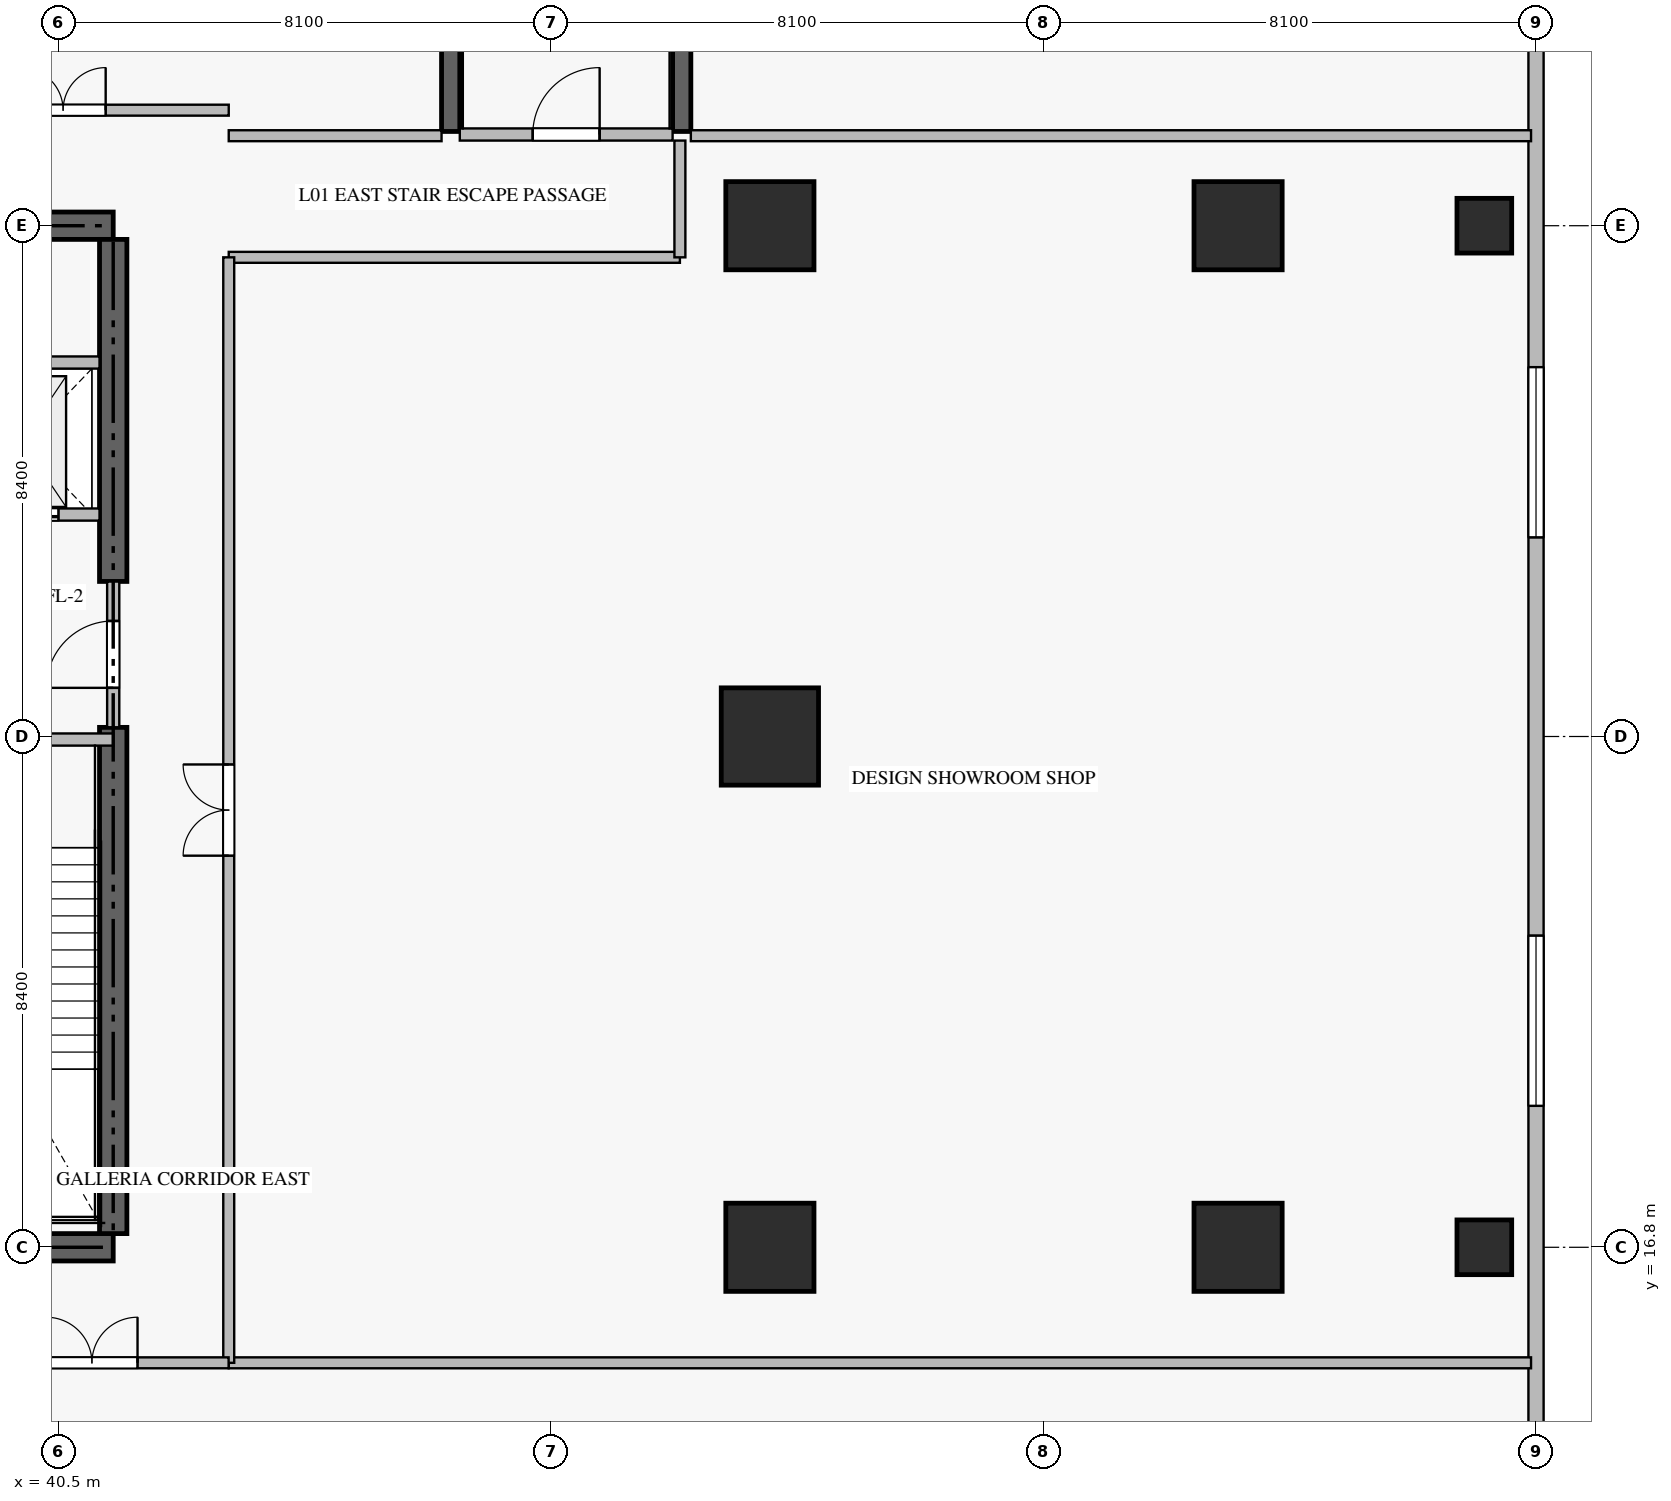
"""IFC4 building model, lengths in metres.
Left out: names, types, materials, properties, quantities, classifications, styles, units other than length and angle.
Written with IfcOpenShell. Run it as: python <this file> out.ifc"""

import sys

from ifc_helpers import new_model, si_unit, direction, frame, frame_2d, origin, origin_2d, place, context, subcontext, project, spatial, rectangle, extrude, source, transform, mapped, element, fill, save


model = new_model("IFC4")
c1 = context("Model", 3, precision=1e-05, world=origin(), true_north=direction((0.0, 1.0)))
c2 = subcontext(c1, "Body", "Model", "MODEL_VIEW")
j1 = project(units=[si_unit("LENGTHUNIT", "METRE"), si_unit("PLANEANGLEUNIT", "RADIAN")], contexts=[c1])
p1 = place(None, origin())
s1 = spatial("IfcSite", under=j1, at=p1, CompositionType="ELEMENT")
p2 = place(p1, origin())
s2 = spatial("IfcBuilding", under=s1, at=p2, CompositionType="ELEMENT")
p3 = place(p2, frame((0.0, 0.0, 5.5)))
s3 = spatial("IfcBuildingStorey", under=s2, at=p3, CompositionType="ELEMENT", Elevation=5.5)
for number, where, z_axis, x_axis in (
    (1, (23.4, 16.8, -0.38), (0.0, 0.0, 1.0), (1.0, 0.0, 0.0)),
    (2, (41.4, 33.6, -0.38), (0.0, 0.0, 1.0), (-1.0, 0.0, 0.0)),
):
    element("IfcWall", number, at=place(p3, frame(where, z_axis=z_axis, x_axis=x_axis)), inside=s3, PredefinedType="SHEAR", context=c2, shape_type="SweptSolid", body=[
        extrude(rectangle(XDim=18.0, YDim=0.45, at=frame_2d((9.0, 0.0))), origin(), (0.0, 0.0, 1.0), 4.998),
    ])
p4 = place(p3, frame((41.4, 17.025, -0.38), z_axis=(0.0, 0.0, 1.0), x_axis=(0.0, 1.0, 0.0)))
e3 = element("IfcWall", 3, at=p4, inside=s3, PredefinedType="SHEAR", context=c2, shape_type="SweptSolid", body=[
    extrude(rectangle(XDim=8.325, YDim=0.45, at=frame_2d((4.163, 0.0))), origin(), (0.0, 0.0, 1.0), 4.998),
])
p5 = place(p3, frame((41.4, 27.75, -0.38), z_axis=(0.0, 0.0, 1.0), x_axis=(0.0, 1.0, 0.0)))
e4 = element("IfcWall", 4, at=p5, inside=s3, PredefinedType="SHEAR", context=c2, shape_type="SweptSolid", body=[
    extrude(rectangle(XDim=5.625, YDim=0.45, at=frame_2d((2.812, 0.0))), origin(), (0.0, 0.0, 1.0), 4.998),
])
m1 = source(origin(), c2, "Body", "SweptSolid", [
    extrude(rectangle(XDim=0.9, YDim=0.9, at=origin_2d()), origin(), (0.0, 0.0, 1.0), 5.0),
])
for number, where, z_axis, x_axis in (
    (5, (63.95, 16.8, -0.38), (0.0, 0.0, 1.0), (1.0, 0.0, 0.0)),
    (6, (63.95, 33.6, -0.38), (0.0, 0.0, 1.0), (1.0, 0.0, 0.0)),
):
    element("IfcColumn", number, at=place(p3, frame(where, z_axis=z_axis, x_axis=x_axis)), inside=s3, PredefinedType="COLUMN", context=c2, shape_type="MappedRepresentation", body=[
        mapped(m1, transform((0.0, 0.0, 0.0), scale=1.0)),
    ])
m2 = source(origin(), c2, "Body", "SweptSolid", [
    extrude(rectangle(XDim=1.45, YDim=1.45, at=origin_2d()), origin(), (0.0, 0.0, 1.0), 5.0),
])
p6 = place(p3, frame((52.2, 16.8, -0.38), z_axis=(0.0, 0.0, 1.0), x_axis=(1.0, 0.0, 0.0)))
e7 = element("IfcColumn", 7, at=p6, inside=s3, PredefinedType="COLUMN", context=c2, shape_type="MappedRepresentation", body=[
    mapped(m2, transform((0.0, 0.0, 0.0), scale=1.0)),
])
m3 = source(origin(), c2, "Body", "SweptSolid", [
    extrude(rectangle(XDim=1.6, YDim=1.6, at=origin_2d()), origin(), (0.0, 0.0, 1.0), 5.0),
])
p7 = place(p3, frame((52.2, 25.2, -0.38), z_axis=(0.0, 0.0, 1.0), x_axis=(1.0, 0.0, 0.0)))
e8 = element("IfcColumn", 8, at=p7, inside=s3, PredefinedType="COLUMN", context=c2, shape_type="MappedRepresentation", body=[
    mapped(m3, transform((0.0, 0.0, 0.0), scale=1.0)),
])
for number, where, z_axis, x_axis in (
    (9, (52.2, 33.6, -0.38), (0.0, 0.0, 1.0), (1.0, 0.0, 0.0)),
    (10, (59.9, 16.8, -0.38), (0.0, 0.0, 1.0), (1.0, 0.0, 0.0)),
    (11, (59.9, 33.6, -0.38), (0.0, 0.0, 1.0), (1.0, 0.0, 0.0)),
):
    element("IfcColumn", number, at=place(p3, frame(where, z_axis=z_axis, x_axis=x_axis)), inside=s3, PredefinedType="COLUMN", context=c2, shape_type="MappedRepresentation", body=[
        mapped(m2, transform((0.0, 0.0, 0.0), scale=1.0)),
    ])
p8 = place(p3, frame((64.8, 4.325, 0.0), z_axis=(0.0, 0.0, 1.0), x_axis=(0.0, 1.0, 0.0)))
e12 = element("IfcWall", 12, at=p8, inside=s3, PredefinedType="ELEMENTEDWALL", context=c2, shape_type="SweptSolid", body=[
    extrude(rectangle(XDim=41.75, YDim=0.25, at=frame_2d((20.875, 0.0))), origin(), (0.0, 0.0, 1.0), 4.605),
])
p9 = place(p8, frame((14.801, 0.0, 0.6)))
e13 = element("IfcOpeningElement", 13, at=p9, cuts=e12, PredefinedType="OPENING", context=c2, shape_type="SweptSolid", body=[
    extrude(rectangle(XDim=2.8, YDim=3.0, at=frame_2d((1.4, 1.5))), frame((0.0, 0.135, 0.0), z_axis=(0.0, -1.0, 0.0), x_axis=(1.0, 0.0, 0.0)), (0.0, 0.0, 1.0), 0.27),
])
p10 = place(p8, frame((24.149, 0.0, 0.6)))
e14 = element("IfcOpeningElement", 14, at=p10, cuts=e12, PredefinedType="OPENING", context=c2, shape_type="SweptSolid", body=[
    extrude(rectangle(XDim=2.8, YDim=3.0, at=frame_2d((1.4, 1.5))), frame((0.0, 0.135, 0.0), z_axis=(0.0, -1.0, 0.0), x_axis=(1.0, 0.0, 0.0)), (0.0, 0.0, 1.0), 0.27),
])
p11 = place(p3, frame((36.95, 25.15, 0.0), z_axis=(0.0, 0.0, 1.0), x_axis=(1.0, 0.0, 0.0)))
e15 = element("IfcWall", 15, at=p11, inside=s3, PredefinedType="STANDARD", context=c2, shape_type="SweptSolid", body=[
    extrude(rectangle(XDim=4.45, YDim=0.2, at=frame_2d((2.225, 0.0))), origin(), (0.0, 0.0, 1.0), 4.62),
])
p12 = place(p11, frame((1.65, 0.0, 0.0)))
e16 = element("IfcOpeningElement", 16, at=p12, cuts=e15, PredefinedType="OPENING", context=c2, shape_type="SweptSolid", body=[
    extrude(rectangle(XDim=1.1, YDim=2.15, at=frame_2d((0.55, 1.075))), frame((0.0, 0.11, 0.0), z_axis=(0.0, -1.0, 0.0), x_axis=(1.0, 0.0, 0.0)), (0.0, 0.0, 1.0), 0.22),
])
for number, where, z_axis, x_axis in (
    (17, (46.95, 35.15, -0.38), (0.0, 0.0, 1.0), (0.0, 1.0, 0.0)),
    (18, (50.75, 35.15, -0.38), (0.0, 0.0, 1.0), (0.0, 1.0, 0.0)),
):
    element("IfcWall", number, at=place(p3, frame(where, z_axis=z_axis, x_axis=x_axis)), inside=s3, PredefinedType="SHEAR", context=c2, shape_type="SweptSolid", body=[
        extrude(rectangle(XDim=7.9, YDim=0.3, at=frame_2d((3.95, 0.0))), origin(), (0.0, 0.0, 1.0), 4.998),
    ])
p13 = place(p3, frame((47.1, 35.1, 0.0), z_axis=(0.0, 0.0, 1.0), x_axis=(1.0, 0.0, 0.0)))
e19 = element("IfcWall", 19, at=p13, inside=s3, PredefinedType="STANDARD", context=c2, shape_type="SweptSolid", body=[
    extrude(rectangle(XDim=3.5, YDim=0.2, at=frame_2d((1.75, 0.0))), origin(), (0.0, 0.0, 1.0), 4.62),
])
p14 = place(p13, frame((1.2, 0.0, 0.0)))
e20 = element("IfcOpeningElement", 20, at=p14, cuts=e19, PredefinedType="OPENING", context=c2, shape_type="SweptSolid", body=[
    extrude(rectangle(XDim=1.1, YDim=2.15, at=frame_2d((0.55, 1.075))), frame((0.0, 0.11, 0.0), z_axis=(0.0, -1.0, 0.0), x_axis=(1.0, 0.0, 0.0)), (0.0, 0.0, 1.0), 0.22),
])
p15 = place(p3, frame((38.75, 28.85, 0.0), z_axis=(0.0, 0.0, 1.0), x_axis=(1.0, 0.0, 0.0)))
e21 = element("IfcWall", 21, at=p15, inside=s3, PredefinedType="STANDARD", context=c2, shape_type="SweptSolid", body=[
    extrude(rectangle(XDim=2.425, YDim=0.2, at=frame_2d((1.212, 0.0))), origin(), (0.0, 0.0, 1.0), 4.62),
])
p16 = place(p15, frame((0.55, 0.0, 0.0)))
e22 = element("IfcOpeningElement", 22, at=p16, cuts=e21, PredefinedType="OPENING", context=c2, shape_type="SweptSolid", body=[
    extrude(rectangle(XDim=1.2, YDim=2.2, at=frame_2d((0.6, 1.1))), frame((0.0, 0.11, 0.0), z_axis=(0.0, -1.0, 0.0), x_axis=(1.0, 0.0, 0.0)), (0.0, 0.0, 1.0), 0.22),
])
p17 = place(p3, frame((38.75, 31.35, 0.0), z_axis=(0.0, 0.0, 1.0), x_axis=(1.0, 0.0, 0.0)))
e23 = element("IfcWall", 23, at=p17, inside=s3, PredefinedType="STANDARD", context=c2, shape_type="SweptSolid", body=[
    extrude(rectangle(XDim=2.425, YDim=0.2, at=frame_2d((1.212, 0.0))), origin(), (0.0, 0.0, 1.0), 4.62),
])
p18 = place(p3, frame((41.4, 25.352, 0.0), z_axis=(0.0, 0.0, 1.0), x_axis=(0.0, 1.0, 0.0)))
e24 = element("IfcWall", 24, at=p18, inside=s3, PredefinedType="STANDARD", context=c2, shape_type="SweptSolid", body=[
    extrude(rectangle(XDim=2.396, YDim=0.2, at=frame_2d((1.198, 0.0))), origin(), (0.0, 0.0, 1.0), 4.62),
])
p19 = place(p18, frame((0.648, 0.0, 0.0)))
e25 = element("IfcOpeningElement", 25, at=p19, cuts=e24, PredefinedType="OPENING", context=c2, shape_type="SweptSolid", body=[
    extrude(rectangle(XDim=1.1, YDim=2.15, at=frame_2d((0.55, 1.075))), frame((0.0, 0.11, 0.0), z_axis=(0.0, -1.0, 0.0), x_axis=(1.0, 0.0, 0.0)), (0.0, 0.0, 1.0), 0.22),
])
p20 = place(p3, frame((43.3, 14.9, 0.0), z_axis=(0.0, 0.0, 1.0), x_axis=(1.0, 0.0, 0.0)))
e26 = element("IfcWall", 26, at=p20, inside=s3, PredefinedType="PARTITIONING", context=c2, shape_type="SweptSolid", body=[
    extrude(rectangle(XDim=21.418, YDim=0.18, at=frame_2d((10.709, 0.0))), origin(), (0.0, 0.0, 1.0), 4.62),
])
p21 = place(p3, frame((43.3, 35.08, 0.0), z_axis=(0.0, 0.0, 1.0), x_axis=(1.0, 0.0, 0.0)))
e27 = element("IfcWall", 27, at=p21, inside=s3, PredefinedType="PARTITIONING", context=c2, shape_type="SweptSolid", body=[
    extrude(rectangle(XDim=3.5, YDim=0.18, at=frame_2d((1.75, 0.0))), origin(), (0.0, 0.0, 1.0), 4.62),
])
p22 = place(p3, frame((43.3, 33.08, 0.0), z_axis=(0.0, 0.0, 1.0), x_axis=(1.0, 0.0, 0.0)))
e28 = element("IfcWall", 28, at=p22, inside=s3, PredefinedType="PARTITIONING", context=c2, shape_type="SweptSolid", body=[
    extrude(rectangle(XDim=7.42, YDim=0.18, at=frame_2d((3.71, 0.0))), origin(), (0.0, 0.0, 1.0), 4.62),
])
p23 = place(p3, frame((50.9, 35.08, 0.0), z_axis=(0.0, 0.0, 1.0), x_axis=(1.0, 0.0, 0.0)))
e29 = element("IfcWall", 29, at=p23, inside=s3, PredefinedType="PARTITIONING", context=c2, shape_type="SweptSolid", body=[
    extrude(rectangle(XDim=13.818, YDim=0.18, at=frame_2d((6.909, 0.0))), origin(), (0.0, 0.0, 1.0), 4.62),
])
p24 = place(p3, frame((50.72, 33.08, 0.0), z_axis=(0.0, 0.0, 1.0), x_axis=(0.0, 1.0, 0.0)))
e30 = element("IfcWall", 30, at=p24, inside=s3, PredefinedType="PARTITIONING", context=c2, shape_type="SweptSolid", body=[
    extrude(rectangle(XDim=1.92, YDim=0.18, at=frame_2d((0.96, 0.0))), origin(), (0.0, 0.0, 1.0), 4.62),
])
p25 = place(p3, frame((43.3, 14.9, 0.0), z_axis=(0.0, 0.0, 1.0), x_axis=(0.0, 1.0, 0.0)))
e31 = element("IfcWall", 31, at=p25, inside=s3, PredefinedType="PARTITIONING", context=c2, shape_type="SweptSolid", body=[
    extrude(rectangle(XDim=18.18, YDim=0.18, at=frame_2d((9.09, 0.0))), origin(), (0.0, 0.0, 1.0), 4.62),
])
p26 = place(p25, frame((8.34, 0.0, 0.0)))
e32 = element("IfcOpeningElement", 32, at=p26, cuts=e31, PredefinedType="OPENING", context=c2, shape_type="SweptSolid", body=[
    extrude(rectangle(XDim=1.5, YDim=2.25, at=frame_2d((0.75, 1.125))), frame((0.0, 0.1, 0.0), z_axis=(0.0, -1.0, 0.0), x_axis=(1.0, 0.0, 0.0)), (0.0, 0.0, 1.0), 0.2),
])
p27 = place(p3, frame((38.802, 14.9, 0.0), z_axis=(0.0, 0.0, 1.0), x_axis=(1.0, 0.0, 0.0)))
e33 = element("IfcWall", 33, at=p27, inside=s3, PredefinedType="PARTITIONING", context=c2, shape_type="SweptSolid", body=[
    extrude(rectangle(XDim=4.496, YDim=0.18, at=frame_2d((2.248, 0.0))), origin(), (0.0, 0.0, 1.0), 4.62),
])
p28 = place(p27, frame((1.498, 0.0, 0.0)))
e34 = element("IfcOpeningElement", 34, at=p28, cuts=e33, PredefinedType="OPENING", context=c2, shape_type="SweptSolid", body=[
    extrude(rectangle(XDim=1.5, YDim=2.25, at=frame_2d((0.75, 1.125))), frame((0.0, 0.1, 0.0), z_axis=(0.0, -1.0, 0.0), x_axis=(1.0, 0.0, 0.0)), (0.0, 0.0, 1.0), 0.2),
])
p29 = place(p3, frame((37.852, 35.5, 0.0), z_axis=(0.0, 0.0, 1.0), x_axis=(1.0, 0.0, 0.0)))
e35 = element("IfcWall", 35, at=p29, inside=s3, PredefinedType="PARTITIONING", context=c2, shape_type="SweptSolid", body=[
    extrude(rectangle(XDim=5.448, YDim=0.18, at=frame_2d((2.724, 0.0))), origin(), (0.0, 0.0, 1.0), 4.62),
])
p30 = place(p29, frame((2.024, 0.0, 0.0)))
e36 = element("IfcOpeningElement", 36, at=p30, cuts=e35, PredefinedType="OPENING", context=c2, shape_type="SweptSolid", body=[
    extrude(rectangle(XDim=1.4, YDim=2.25, at=frame_2d((0.7, 1.125))), frame((0.0, 0.1, 0.0), z_axis=(0.0, -1.0, 0.0), x_axis=(1.0, 0.0, 0.0)), (0.0, 0.0, 1.0), 0.2),
])
m4 = source(origin(), c2, "Body", "SweptSolid", [
    extrude(rectangle(XDim=2.8, YDim=3.0, at=frame_2d((1.4, 1.5))), frame((0.0, 0.03, 0.0), z_axis=(0.0, -1.0, 0.0), x_axis=(1.0, 0.0, 0.0)), (0.0, 0.0, 1.0), 0.06),
])
p31 = place(p9, origin())
e37 = element("IfcWindow", 37, at=p31, inside=s3, PartitioningType="SINGLE_PANEL", PredefinedType="WINDOW", context=c2, shape_type="MappedRepresentation", body=[
    mapped(m4, transform((0.0, 0.0, 0.0), scale=1.0)),
])
fill(e13, e37)
p32 = place(p10, origin())
e38 = element("IfcWindow", 38, at=p32, inside=s3, PartitioningType="SINGLE_PANEL", PredefinedType="WINDOW", context=c2, shape_type="MappedRepresentation", body=[
    mapped(m4, transform((0.0, 0.0, 0.0), scale=1.0)),
])
fill(e14, e38)
m5 = source(origin(), c2, "Body", "SweptSolid", [
    extrude(rectangle(XDim=1.1, YDim=2.15, at=frame_2d((0.55, 1.075))), frame((0.0, 0.025, 0.0), z_axis=(0.0, -1.0, 0.0), x_axis=(1.0, 0.0, 0.0)), (0.0, 0.0, 1.0), 0.05),
])
p33 = place(p14, origin())
e39 = element("IfcDoor", 39, at=p33, inside=s3, OperationType="SINGLE_SWING_RIGHT", PredefinedType="DOOR", context=c2, shape_type="MappedRepresentation", body=[
    mapped(m5, transform((0.0, 0.0, 0.0), scale=1.0)),
])
fill(e20, e39)
m6 = source(origin(), c2, "Body", "SweptSolid", [
    extrude(rectangle(XDim=1.2, YDim=2.2, at=frame_2d((0.6, 1.1))), frame((0.0, 0.025, 0.0), z_axis=(0.0, -1.0, 0.0), x_axis=(1.0, 0.0, 0.0)), (0.0, 0.0, 1.0), 0.05),
])
p34 = place(p16, origin())
e40 = element("IfcDoor", 40, at=p34, inside=s3, OperationType="DOUBLE_DOOR_SLIDING", PredefinedType="DOOR", context=c2, shape_type="MappedRepresentation", body=[
    mapped(m6, transform((0.0, 0.0, 0.0), scale=1.0)),
])
fill(e22, e40)
p35 = place(p19, origin())
e41 = element("IfcDoor", 41, at=p35, inside=s3, OperationType="SINGLE_SWING_LEFT", PredefinedType="DOOR", context=c2, shape_type="MappedRepresentation", body=[
    mapped(m5, transform((0.0, 0.0, 0.0), scale=1.0)),
])
fill(e25, e41)
m7 = source(origin(), c2, "Body", "SweptSolid", [
    extrude(rectangle(XDim=1.5, YDim=2.25, at=frame_2d((0.75, 1.125))), frame((0.0, 0.025, 0.0), z_axis=(0.0, -1.0, 0.0), x_axis=(1.0, 0.0, 0.0)), (0.0, 0.0, 1.0), 0.05),
])
p36 = place(p26, origin())
e42 = element("IfcDoor", 42, at=p36, inside=s3, OperationType="DOUBLE_DOOR_SINGLE_SWING", PredefinedType="DOOR", context=c2, shape_type="MappedRepresentation", body=[
    mapped(m7, transform((0.0, 0.0, 0.0), scale=1.0)),
])
fill(e32, e42)
p37 = place(p28, origin())
e43 = element("IfcDoor", 43, at=p37, inside=s3, OperationType="DOUBLE_DOOR_SINGLE_SWING", PredefinedType="DOOR", context=c2, shape_type="MappedRepresentation", body=[
    mapped(m7, transform((0.0, 0.0, 0.0), scale=1.0)),
])
fill(e34, e43)
m8 = source(origin(), c2, "Body", "SweptSolid", [
    extrude(rectangle(XDim=1.4, YDim=2.25, at=frame_2d((0.7, 1.125))), frame((0.0, 0.025, 0.0), z_axis=(0.0, -1.0, 0.0), x_axis=(1.0, 0.0, 0.0)), (0.0, 0.0, 1.0), 0.05),
])
p38 = place(p30, origin())
e44 = element("IfcDoor", 44, at=p38, inside=s3, OperationType="DOUBLE_DOOR_SINGLE_SWING", PredefinedType="DOOR", context=c2, shape_type="MappedRepresentation", body=[
    mapped(m8, transform((0.0, 0.0, 0.0), scale=1.0)),
])
fill(e36, e44)
save(model, sys.argv[1])
